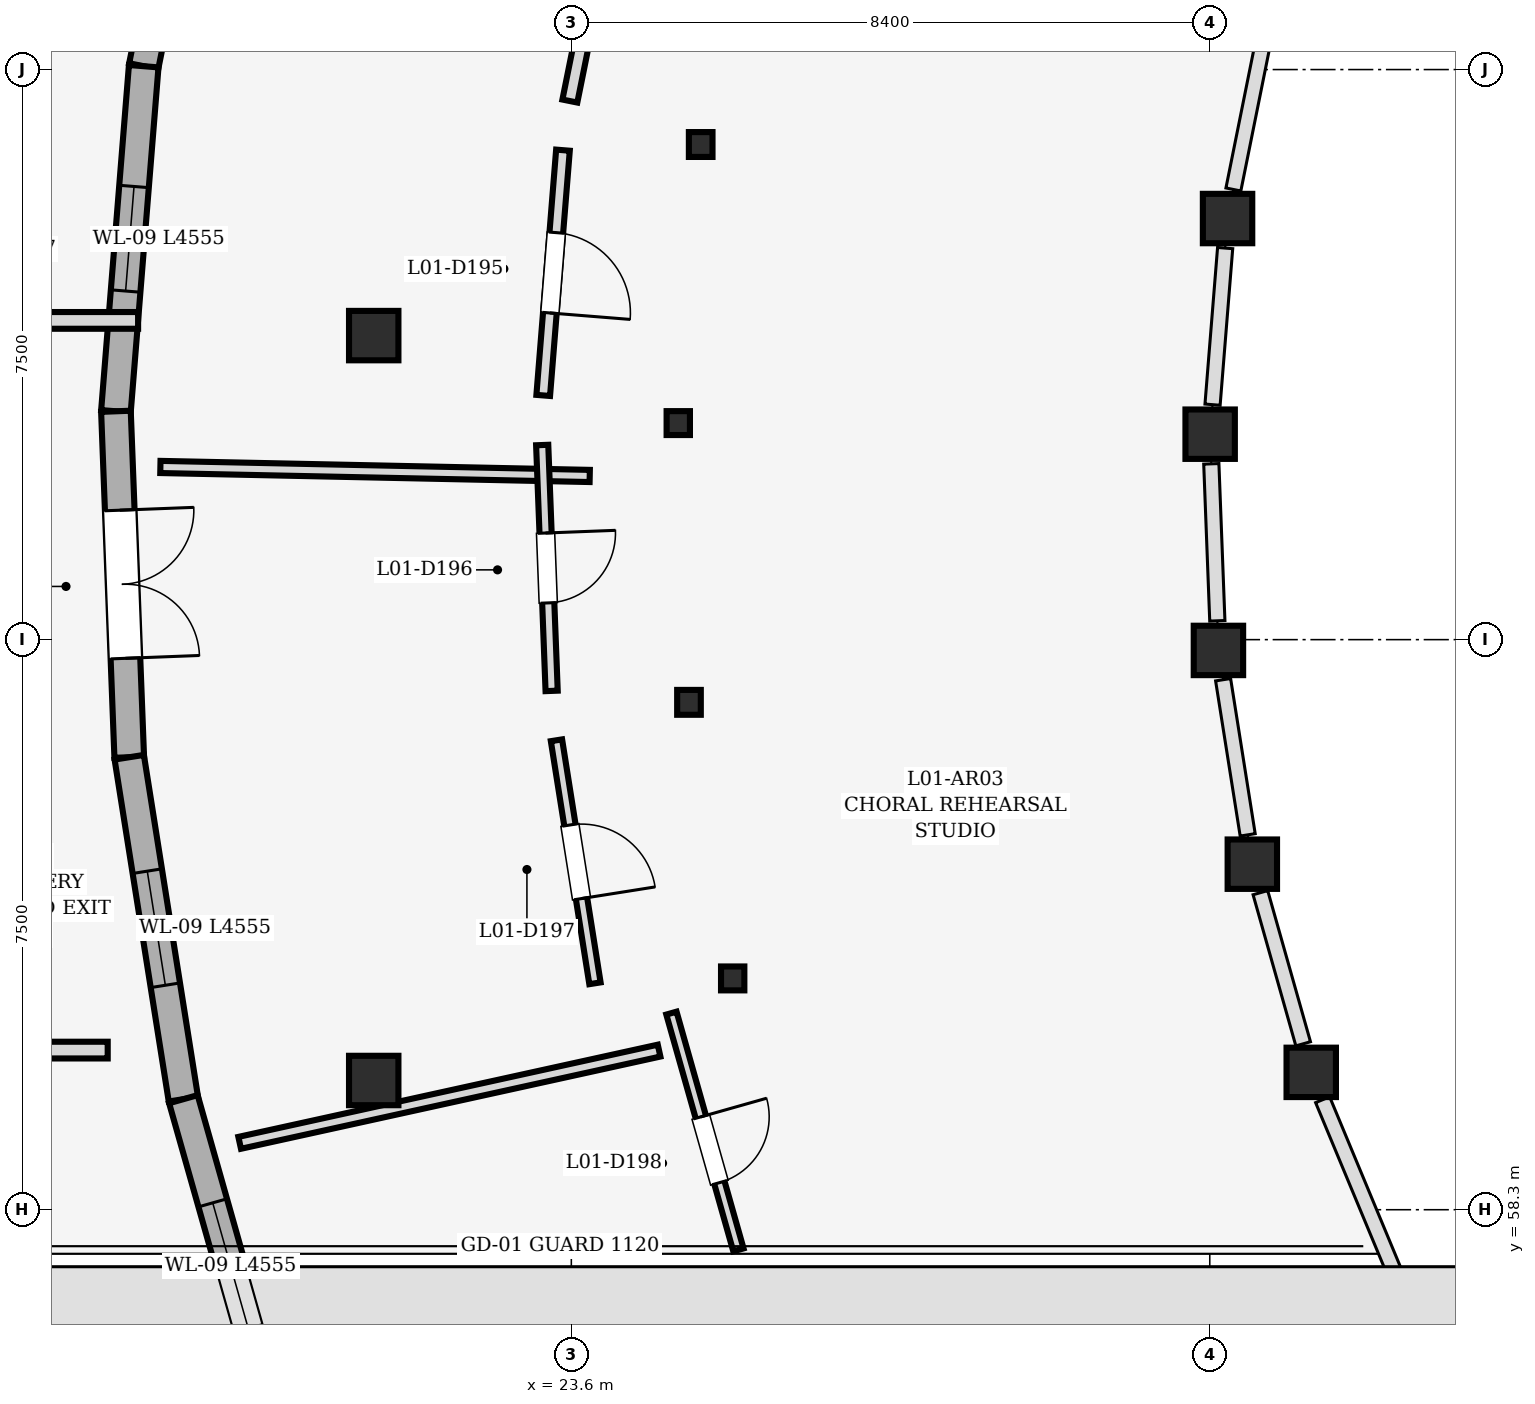
"""IFC4 building model, lengths in metres.
Left out: names, types, materials, properties, quantities, classifications, styles, units other than length and angle.
Written with IfcOpenShell. Run it as: python <this file> out.ifc"""

import sys

from ifc_helpers import new_model, si_unit, direction, frame, frame_2d, origin, origin_2d, place, context, subcontext, project, spatial, rectangle, i_section, extrude, element, fill, save


model = new_model("IFC4")
c1 = context("Model", 3, precision=1e-05, world=origin(), true_north=direction((0.0, 1.0)))
c2 = subcontext(c1, "Body", "Model", "MODEL_VIEW")
j1 = project(units=[si_unit("LENGTHUNIT", "METRE"), si_unit("PLANEANGLEUNIT", "RADIAN")], contexts=[c1])
p1 = place(None, origin())
s1 = spatial("IfcSite", under=j1, at=p1, CompositionType="ELEMENT")
p2 = place(p1, origin())
s2 = spatial("IfcBuilding", under=s1, at=p2, CompositionType="ELEMENT")
p3 = place(p2, origin())
s3 = spatial("IfcBuildingStorey", under=s2, at=p3, CompositionType="ELEMENT", Elevation=0.0)
p4 = place(p3, frame((32.234, 71.34, 0.0), z_axis=(0.0, 0.0, 1.0), x_axis=(1.0, 0.0, 0.0)))
e1 = element("IfcColumn", 1, at=p4, inside=s3, PredefinedType="COLUMN", context=c2, shape_type="SweptSolid", body=[
    extrude(rectangle(XDim=0.65, YDim=0.65, at=origin_2d()), origin(), (0.0, 0.0, 1.0), 5.4),
])
p5 = place(p3, frame((25.302, 72.314, 0.0), z_axis=(0.0, 0.0, 1.0), x_axis=(1.0, 0.0, 0.0)))
e2 = element("IfcColumn", 2, at=p5, inside=s3, PredefinedType="COLUMN", context=c2, shape_type="SweptSolid", body=[
    extrude(i_section(OverallWidth=0.311, OverallDepth=0.327, WebThickness=0.016, FlangeThickness=0.025, at=origin_2d()), origin(), (0.0, 0.0, 1.0), 5.4),
])
p6 = place(p3, frame((32.005, 68.503, 0.0), z_axis=(0.0, 0.0, 1.0), x_axis=(1.0, 0.0, 0.0)))
e3 = element("IfcColumn", 3, at=p6, inside=s3, PredefinedType="COLUMN", context=c2, shape_type="SweptSolid", body=[
    extrude(rectangle(XDim=0.65, YDim=0.65, at=origin_2d()), origin(), (0.0, 0.0, 1.0), 5.4),
])
p7 = place(p3, frame((25.007, 68.649, 0.0), z_axis=(0.0, 0.0, 1.0), x_axis=(1.0, 0.0, 0.0)))
e4 = element("IfcColumn", 4, at=p7, inside=s3, PredefinedType="COLUMN", context=c2, shape_type="SweptSolid", body=[
    extrude(i_section(OverallWidth=0.307, OverallDepth=0.315, WebThickness=0.012, FlangeThickness=0.019, at=origin_2d()), origin(), (0.0, 0.0, 1.0), 5.4),
])
p8 = place(p3, frame((32.114, 65.658, 0.0), z_axis=(0.0, 0.0, 1.0), x_axis=(1.0, 0.0, 0.0)))
e5 = element("IfcColumn", 5, at=p8, inside=s3, PredefinedType="COLUMN", context=c2, shape_type="SweptSolid", body=[
    extrude(rectangle(XDim=0.65, YDim=0.65, at=origin_2d()), origin(), (0.0, 0.0, 1.0), 5.4),
])
p9 = place(p3, frame((25.148, 64.975, 0.0), z_axis=(0.0, 0.0, 1.0), x_axis=(1.0, 0.0, 0.0)))
e6 = element("IfcColumn", 6, at=p9, inside=s3, PredefinedType="COLUMN", context=c2, shape_type="SweptSolid", body=[
    extrude(i_section(OverallWidth=0.311, OverallDepth=0.327, WebThickness=0.016, FlangeThickness=0.025, at=origin_2d()), origin(), (0.0, 0.0, 1.0), 5.4),
])
p10 = place(p3, frame((32.56, 62.846, 0.0), z_axis=(0.0, 0.0, 1.0), x_axis=(1.0, 0.0, 0.0)))
e7 = element("IfcColumn", 7, at=p10, inside=s3, PredefinedType="COLUMN", context=c2, shape_type="SweptSolid", body=[
    extrude(rectangle(XDim=0.65, YDim=0.65, at=origin_2d()), origin(), (0.0, 0.0, 1.0), 5.4),
])
p11 = place(p3, frame((25.723, 61.343, 0.0), z_axis=(0.0, 0.0, 1.0), x_axis=(1.0, 0.0, 0.0)))
e8 = element("IfcColumn", 8, at=p11, inside=s3, PredefinedType="COLUMN", context=c2, shape_type="SweptSolid", body=[
    extrude(i_section(OverallWidth=0.307, OverallDepth=0.315, WebThickness=0.012, FlangeThickness=0.019, at=origin_2d()), origin(), (0.0, 0.0, 1.0), 5.4),
])
for number, where, z_axis, x_axis in (
    (9, (33.335, 60.107, 0.0), (0.0, 0.0, 1.0), (1.0, 0.0, 0.0)),
    (10, (21.0, 60.0, 0.0), (0.0, 0.0, 1.0), (1.0, 0.0, 0.0)),
    (11, (21.0, 69.8, 0.0), (0.0, 0.0, 1.0), (1.0, 0.0, 0.0)),
):
    element("IfcColumn", number, at=place(p3, frame(where, z_axis=z_axis, x_axis=x_axis)), inside=s3, PredefinedType="COLUMN", context=c2, shape_type="SweptSolid", body=[
        extrude(rectangle(XDim=0.65, YDim=0.65, at=origin_2d()), origin(), (0.0, 0.0, 1.0), 5.4),
    ])
p12 = place(p3, frame((18.874, 77.809, 0.0), z_axis=(0.0, 0.0, 1.0), x_axis=(-0.197682700785, -0.980266060726, 0.0)))
e12 = element("IfcWall", 12, at=p12, inside=s3, PredefinedType="STANDARD", context=c2, shape_type="SweptSolid", body=[
    extrude(rectangle(XDim=4.555, YDim=0.39, at=frame_2d((2.277, 0.0))), origin(), (0.0, 0.0, 1.0), 4.6),
])
p13 = place(p12, frame((1.657, 0.0, 0.85)))
e13 = element("IfcOpeningElement", 13, at=p13, cuts=e12, PredefinedType="OPENING", context=c2, shape_type="SweptSolid", body=[
    extrude(rectangle(XDim=1.24, YDim=1.75, at=frame_2d((0.62, 0.875))), frame((0.0, 0.207, 0.0), z_axis=(0.0, -1.0, 0.0), x_axis=(1.0, 0.0, 0.0)), (0.0, 0.0, 1.0), 0.414),
])
p14 = place(p3, frame((17.974, 73.344, 0.0), z_axis=(0.0, 0.0, 1.0), x_axis=(-0.080188345633, -0.996779729541, 0.0)))
e14 = element("IfcWall", 14, at=p14, inside=s3, PredefinedType="STANDARD", context=c2, shape_type="SweptSolid", body=[
    extrude(rectangle(XDim=4.555, YDim=0.39, at=frame_2d((2.277, 0.0))), origin(), (0.0, 0.0, 1.0), 4.6),
])
p15 = place(p14, frame((1.587, 0.0, 0.85)))
e15 = element("IfcOpeningElement", 15, at=p15, cuts=e14, PredefinedType="OPENING", context=c2, shape_type="SweptSolid", body=[
    extrude(rectangle(XDim=1.38, YDim=1.75, at=frame_2d((0.69, 0.875))), frame((0.0, 0.207, 0.0), z_axis=(0.0, -1.0, 0.0), x_axis=(1.0, 0.0, 0.0)), (0.0, 0.0, 1.0), 0.414),
])
p16 = place(p3, frame((17.608, 68.804, 0.0), z_axis=(0.0, 0.0, 1.0), x_axis=(0.038377542804, -0.999263310749, 0.0)))
e16 = element("IfcWall", 16, at=p16, inside=s3, PredefinedType="STANDARD", context=c2, shape_type="SweptSolid", body=[
    extrude(rectangle(XDim=4.555, YDim=0.39, at=frame_2d((2.277, 0.0))), origin(), (0.0, 0.0, 1.0), 4.6),
])
p17 = place(p16, frame((1.302, 0.0, 0.0)))
e17 = element("IfcOpeningElement", 17, at=p17, cuts=e16, PredefinedType="OPENING", context=c2, shape_type="SweptSolid", body=[
    extrude(rectangle(XDim=1.95, YDim=2.3, at=frame_2d((0.975, 1.15))), frame((0.0, 0.207, 0.0), z_axis=(0.0, -1.0, 0.0), x_axis=(1.0, 0.0, 0.0)), (0.0, 0.0, 1.0), 0.414),
])
p18 = place(p3, frame((17.783, 64.253, 0.0), z_axis=(0.0, 0.0, 1.0), x_axis=(0.156466273676, -0.987683302077, 0.0)))
e18 = element("IfcWall", 18, at=p18, inside=s3, PredefinedType="STANDARD", context=c2, shape_type="SweptSolid", body=[
    extrude(rectangle(XDim=4.555, YDim=0.39, at=frame_2d((2.277, 0.0))), origin(), (0.0, 0.0, 1.0), 4.6),
])
p19 = place(p18, frame((1.517, 0.0, 0.85)))
e19 = element("IfcOpeningElement", 19, at=p19, cuts=e18, PredefinedType="OPENING", context=c2, shape_type="SweptSolid", body=[
    extrude(rectangle(XDim=1.52, YDim=1.75, at=frame_2d((0.76, 0.875))), frame((0.0, 0.207, 0.0), z_axis=(0.0, -1.0, 0.0), x_axis=(1.0, 0.0, 0.0)), (0.0, 0.0, 1.0), 0.414),
])
p20 = place(p3, frame((19.736, 55.372, 0.0), z_axis=(0.0, 0.0, 1.0), x_axis=(-0.272249427892, 0.962226713936, 0.0)))
e20 = element("IfcWall", 20, at=p20, inside=s3, PredefinedType="STANDARD", context=c2, shape_type="SweptSolid", body=[
    extrude(rectangle(XDim=4.555, YDim=0.39, at=frame_2d((2.277, 0.0))), origin(), (0.0, 0.0, 1.0), 4.6),
])
p21 = place(p20, frame((1.417, 0.0, 0.85)))
e21 = element("IfcOpeningElement", 21, at=p21, cuts=e20, PredefinedType="OPENING", context=c2, shape_type="SweptSolid", body=[
    extrude(rectangle(XDim=1.72, YDim=1.75, at=frame_2d((0.86, 0.875))), frame((0.0, 0.207, 0.0), z_axis=(0.0, -1.0, 0.0), x_axis=(1.0, 0.0, 0.0)), (0.0, 0.0, 1.0), 0.414),
])
p22 = place(p3, frame((7.46, 60.4, 0.0), z_axis=(0.0, 0.0, 1.0), x_axis=(1.0, 0.0, 0.0)))
e22 = element("IfcWall", 22, at=p22, inside=s3, PredefinedType="SOLIDWALL", context=c2, shape_type="SweptSolid", body=[
    extrude(rectangle(XDim=10.04, YDim=0.22, at=frame_2d((5.02, 0.0))), origin(), (0.0, 0.0, 1.0), 4.407),
])
p23 = place(p3, frame((17.9, 70.0, 0.0), z_axis=(0.0, 0.0, 1.0), x_axis=(-1.0, 0.0, 0.0)))
e23 = element("IfcWall", 23, at=p23, inside=s3, PredefinedType="SOLIDWALL", context=c2, shape_type="SweptSolid", body=[
    extrude(rectangle(XDim=3.44, YDim=0.22, at=frame_2d((1.72, 0.0))), origin(), (0.0, 0.0, 1.0), 5.105),
])
p24 = place(p23, frame((1.195, 0.0, 0.0)))
e24 = element("IfcOpeningElement", 24, at=p24, cuts=e23, PredefinedType="OPENING", context=c2, shape_type="SweptSolid", body=[
    extrude(rectangle(XDim=1.05, YDim=2.15, at=frame_2d((0.525, 1.075))), frame((0.0, 0.122, 0.0), z_axis=(0.0, -1.0, 0.0), x_axis=(1.0, 0.0, 0.0)), (0.0, 0.0, 1.0), 0.244),
])
p25 = place(p3, frame((23.842, 67.953, 0.0), z_axis=(0.0, 0.0, 1.0), x_axis=(-0.999780386636, 0.020956586028, 0.0)))
e25 = element("IfcWall", 25, at=p25, inside=s3, PredefinedType="PARTITIONING", context=c2, shape_type="SweptSolid", body=[
    extrude(rectangle(XDim=5.65, YDim=0.16, at=frame_2d((2.825, 0.0))), origin(), (0.0, 0.0, 1.0), 5.105),
])
p26 = place(p3, frame((24.755, 60.393, 0.0), z_axis=(0.0, 0.0, 1.0), x_axis=(-0.976668579504, -0.214752149721, 0.0)))
e26 = element("IfcWall", 26, at=p26, inside=s3, PredefinedType="PARTITIONING", context=c2, shape_type="SweptSolid", body=[
    extrude(rectangle(XDim=5.65, YDim=0.16, at=frame_2d((2.825, 0.0))), origin(), (0.0, 0.0, 1.0), 4.407),
])
p27 = place(p3, frame((24.22, 76.059, 0.0), z_axis=(0.0, 0.0, 1.0), x_axis=(-0.197609875313, -0.980280744062, 0.0)))
e27 = element("IfcWall", 27, at=p27, inside=s3, PredefinedType="PARTITIONING", context=c2, shape_type="SweptSolid", body=[
    extrude(rectangle(XDim=3.237, YDim=0.2, at=frame_2d((1.618, 0.0))), origin(), (0.0, 0.0, 1.0), 5.105),
])
p28 = place(p27, frame((1.019, 0.0, 0.0)))
e28 = element("IfcOpeningElement", 28, at=p28, cuts=e27, PredefinedType="OPENING", context=c2, shape_type="SweptSolid", body=[
    extrude(rectangle(XDim=1.2, YDim=2.3, at=frame_2d((0.6, 1.15))), frame((0.0, 0.112, 0.0), z_axis=(0.0, -1.0, 0.0), x_axis=(1.0, 0.0, 0.0)), (0.0, 0.0, 1.0), 0.224),
])
p29 = place(p3, frame((23.49, 72.24, 0.0), z_axis=(0.0, 0.0, 1.0), x_axis=(-0.080248823667, -0.996774862394, 0.0)))
e29 = element("IfcWall", 29, at=p29, inside=s3, PredefinedType="PARTITIONING", context=c2, shape_type="SweptSolid", body=[
    extrude(rectangle(XDim=3.237, YDim=0.18, at=frame_2d((1.619, 0.0))), origin(), (0.0, 0.0, 1.0), 5.105),
])
p30 = place(p29, frame((1.088, 0.0, 0.0)))
e30 = element("IfcOpeningElement", 30, at=p30, cuts=e29, PredefinedType="OPENING", context=c2, shape_type="SweptSolid", body=[
    extrude(rectangle(XDim=1.06, YDim=2.24, at=frame_2d((0.53, 1.12))), frame((0.0, 0.102, 0.0), z_axis=(0.0, -1.0, 0.0), x_axis=(1.0, 0.0, 0.0)), (0.0, 0.0, 1.0), 0.204),
])
p31 = place(p3, frame((23.217, 68.36, 0.0), z_axis=(0.0, 0.0, 1.0), x_axis=(0.038386780722, -0.999262955916, 0.0)))
e31 = element("IfcWall", 31, at=p31, inside=s3, PredefinedType="PARTITIONING", context=c2, shape_type="SweptSolid", body=[
    extrude(rectangle(XDim=3.237, YDim=0.16, at=frame_2d((1.619, 0.0))), origin(), (0.0, 0.0, 1.0), 5.105),
])
p32 = place(p31, frame((1.158, 0.0, 0.0)))
e32 = element("IfcOpeningElement", 32, at=p32, cuts=e31, PredefinedType="OPENING", context=c2, shape_type="SweptSolid", body=[
    extrude(rectangle(XDim=0.92, YDim=2.1, at=frame_2d((0.46, 1.05))), frame((0.0, 0.092, 0.0), z_axis=(0.0, -1.0, 0.0), x_axis=(1.0, 0.0, 0.0)), (0.0, 0.0, 1.0), 0.184),
])
p33 = place(p3, frame((23.405, 64.476, 0.0), z_axis=(0.0, 0.0, 1.0), x_axis=(0.156419556763, -0.987690701719, 0.0)))
e33 = element("IfcWall", 33, at=p33, inside=s3, PredefinedType="PARTITIONING", context=c2, shape_type="SweptSolid", body=[
    extrude(rectangle(XDim=3.237, YDim=0.15, at=frame_2d((1.619, 0.0))), origin(), (0.0, 0.0, 1.0), 5.105),
])
p34 = place(p33, frame((1.128, 0.0, 0.0)))
e34 = element("IfcOpeningElement", 34, at=p34, cuts=e33, PredefinedType="OPENING", context=c2, shape_type="SweptSolid", body=[
    extrude(rectangle(XDim=0.98, YDim=2.15, at=frame_2d((0.49, 1.075))), frame((0.0, 0.087, 0.0), z_axis=(0.0, -1.0, 0.0), x_axis=(1.0, 0.0, 0.0)), (0.0, 0.0, 1.0), 0.174),
])
p35 = place(p3, frame((24.917, 60.886, 0.0), z_axis=(0.0, 0.0, 1.0), x_axis=(0.272269765162, -0.96222095954, 0.0)))
e35 = element("IfcWall", 35, at=p35, inside=s3, PredefinedType="PARTITIONING", context=c2, shape_type="SweptSolid", body=[
    extrude(rectangle(XDim=3.237, YDim=0.14, at=frame_2d((1.619, 0.0))), origin(), (0.0, 0.0, 1.0), 5.105),
])
p36 = place(p35, frame((1.418, 0.0, 0.0)))
e36 = element("IfcOpeningElement", 36, at=p36, cuts=e35, PredefinedType="OPENING", context=c2, shape_type="SweptSolid", body=[
    extrude(rectangle(XDim=0.9, YDim=2.1, at=frame_2d((0.45, 1.05))), frame((0.0, 0.082, 0.0), z_axis=(0.0, -1.0, 0.0), x_axis=(1.0, 0.0, 0.0)), (0.0, 0.0, 1.0), 0.164),
])
p37 = place(p15, origin())
e37 = element("IfcWindow", 37, at=p37, inside=s3, PartitioningType="DOUBLE_PANEL_VERTICAL", PredefinedType="WINDOW", context=c2, shape_type="SweptSolid", body=[
    extrude(rectangle(XDim=1.38, YDim=1.75, at=frame_2d((0.69, 0.875))), frame((0.0, 0.03, 0.0), z_axis=(0.0, -1.0, 0.0), x_axis=(1.0, 0.0, 0.0)), (0.0, 0.0, 1.0), 0.06),
])
fill(e15, e37)
p38 = place(p17, origin())
e38 = element("IfcDoor", 38, at=p38, inside=s3, OperationType="DOUBLE_DOOR_SINGLE_SWING", PredefinedType="DOOR", context=c2, shape_type="SweptSolid", body=[
    extrude(rectangle(XDim=1.95, YDim=2.3, at=frame_2d((0.975, 1.15))), frame((0.0, 0.025, 0.0), z_axis=(0.0, -1.0, 0.0), x_axis=(1.0, 0.0, 0.0)), (0.0, 0.0, 1.0), 0.05),
])
fill(e17, e38)
p39 = place(p19, origin())
e39 = element("IfcWindow", 39, at=p39, inside=s3, PartitioningType="DOUBLE_PANEL_VERTICAL", PredefinedType="WINDOW", context=c2, shape_type="SweptSolid", body=[
    extrude(rectangle(XDim=1.52, YDim=1.75, at=frame_2d((0.76, 0.875))), frame((0.0, 0.03, 0.0), z_axis=(0.0, -1.0, 0.0), x_axis=(1.0, 0.0, 0.0)), (0.0, 0.0, 1.0), 0.06),
])
fill(e19, e39)
p40 = place(p21, origin())
e40 = element("IfcWindow", 40, at=p40, inside=s3, PartitioningType="DOUBLE_PANEL_VERTICAL", PredefinedType="WINDOW", context=c2, shape_type="SweptSolid", body=[
    extrude(rectangle(XDim=1.72, YDim=1.75, at=frame_2d((0.86, 0.875))), frame((0.0, 0.03, 0.0), z_axis=(0.0, -1.0, 0.0), x_axis=(1.0, 0.0, 0.0)), (0.0, 0.0, 1.0), 0.06),
])
fill(e21, e40)
p41 = place(p30, origin())
e41 = element("IfcDoor", 41, at=p41, inside=s3, OperationType="SINGLE_SWING_RIGHT", PredefinedType="DOOR", context=c2, shape_type="SweptSolid", body=[
    extrude(rectangle(XDim=1.06, YDim=2.24, at=frame_2d((0.53, 1.12))), frame((0.0, 0.025, 0.0), z_axis=(0.0, -1.0, 0.0), x_axis=(1.0, 0.0, 0.0)), (0.0, 0.0, 1.0), 0.05),
])
fill(e30, e41)
p42 = place(p32, origin())
e42 = element("IfcDoor", 42, at=p42, inside=s3, OperationType="SINGLE_SWING_LEFT", PredefinedType="DOOR", context=c2, shape_type="SweptSolid", body=[
    extrude(rectangle(XDim=0.92, YDim=2.1, at=frame_2d((0.46, 1.05))), frame((0.0, 0.025, 0.0), z_axis=(0.0, -1.0, 0.0), x_axis=(1.0, 0.0, 0.0)), (0.0, 0.0, 1.0), 0.05),
])
fill(e32, e42)
p43 = place(p34, origin())
e43 = element("IfcDoor", 43, at=p43, inside=s3, OperationType="SINGLE_SWING_RIGHT", PredefinedType="DOOR", context=c2, shape_type="SweptSolid", body=[
    extrude(rectangle(XDim=0.98, YDim=2.15, at=frame_2d((0.49, 1.075))), frame((0.0, 0.025, 0.0), z_axis=(0.0, -1.0, 0.0), x_axis=(1.0, 0.0, 0.0)), (0.0, 0.0, 1.0), 0.05),
])
fill(e34, e43)
p44 = place(p36, origin())
e44 = element("IfcDoor", 44, at=p44, inside=s3, OperationType="SINGLE_SWING_LEFT", PredefinedType="DOOR", context=c2, shape_type="SweptSolid", body=[
    extrude(rectangle(XDim=0.9, YDim=2.1, at=frame_2d((0.45, 1.05))), frame((0.0, 0.025, 0.0), z_axis=(0.0, -1.0, 0.0), x_axis=(1.0, 0.0, 0.0)), (0.0, 0.0, 1.0), 0.05),
])
fill(e36, e44)
save(model, sys.argv[1])
